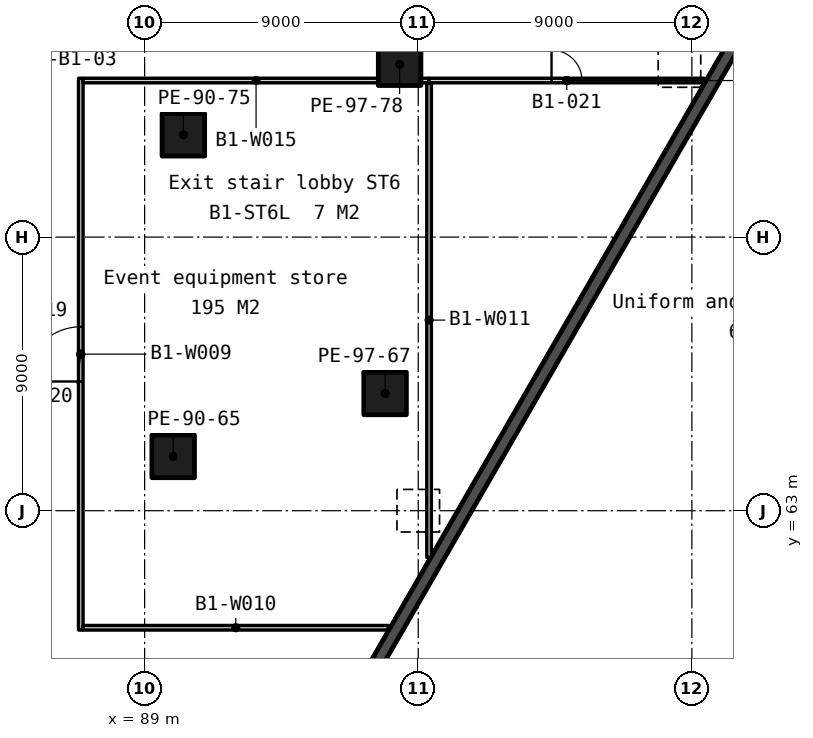
"""IFC4 building model, lengths in metres.
Left out: names, types, materials, properties, quantities, classifications, styles, units other than length and angle.
Written with IfcOpenShell. Run it as: python <this file> out.ifc"""

import sys

from ifc_helpers import new_model, si_unit, direction, frame, frame_2d, origin, origin_2d, place, context, subcontext, project, spatial, rectangle, extrude, element, fill, save


model = new_model("IFC4")
c1 = context("Model", 3, precision=1e-05, world=origin(), true_north=direction((0.0, 1.0)))
c2 = subcontext(c1, "Body", "Model", "MODEL_VIEW")
j1 = project(units=[si_unit("LENGTHUNIT", "METRE"), si_unit("PLANEANGLEUNIT", "RADIAN")], contexts=[c1])
p1 = place(None, origin())
s1 = spatial("IfcSite", under=j1, at=p1, CompositionType="ELEMENT")
p2 = place(p1, origin())
s2 = spatial("IfcBuilding", under=s1, at=p2, CompositionType="ELEMENT")
p3 = place(p2, frame((0.0, 0.0, -4.5)))
s3 = spatial("IfcBuildingStorey", under=s2, at=p3, CompositionType="ELEMENT", Elevation=-4.5)
p4 = place(p3, frame((137.688, 129.089, -0.25), z_axis=(0.0, 0.0, 1.0), x_axis=(-0.499999742059, -0.866025552707, 0.0)))
e1 = element("IfcWall", 1, at=p4, inside=s3, PredefinedType="SOLIDWALL", context=c2, shape_type="SweptSolid", body=[
    extrude(rectangle(XDim=105.659, YDim=0.4, at=frame_2d((52.829, 0.0))), origin(), (0.0, 0.0, 1.0), 4.45),
])
for number, where, z_axis, x_axis in (
    (2, (89.939, 64.786, 0.0), (0.0, 0.0, 1.0), (1.0, 0.0, 0.0)),
    (3, (90.274, 75.366, 0.0), (0.0, 0.0, 1.0), (1.0, 0.0, 0.0)),
    (4, (96.909, 66.857, 0.0), (0.0, 0.0, 1.0), (1.0, 0.0, 0.0)),
    (5, (97.387, 77.686, 0.0), (0.0, 0.0, 1.0), (1.0, 0.0, 0.0)),
):
    element("IfcColumn", number, at=place(p3, frame(where, z_axis=z_axis, x_axis=x_axis)), inside=s3, PredefinedType="COLUMN", context=c2, shape_type="SweptSolid", body=[
        extrude(rectangle(XDim=1.4, YDim=1.4, at=origin_2d()), origin(), (0.0, 0.0, 1.0), 4.5),
    ])
p5 = place(p3, frame((86.9, 59.075, 0.0), z_axis=(0.0, 0.0, 1.0), x_axis=(0.0, 1.0, 0.0)))
e6 = element("IfcWall", 6, at=p5, inside=s3, PredefinedType="PARTITIONING", context=c2, shape_type="SweptSolid", body=[
    extrude(rectangle(XDim=18.15, YDim=0.15, at=frame_2d((9.075, 0.0))), origin(), (0.0, 0.0, 1.0), 4.2),
])
p6 = place(p5, frame((8.175, 0.0, 0.0)))
e7 = element("IfcOpeningElement", 7, at=p6, cuts=e6, PredefinedType="OPENING", context=c2, shape_type="SweptSolid", body=[
    extrude(rectangle(XDim=1.8, YDim=2.1, at=frame_2d((0.9, 1.05))), frame((0.0, 0.085, 0.0), z_axis=(0.0, -1.0, 0.0), x_axis=(1.0, 0.0, 0.0)), (0.0, 0.0, 1.0), 0.17),
])
p7 = place(p3, frame((86.975, 59.15, 0.0), z_axis=(0.0, 0.0, 1.0), x_axis=(1.0, 0.0, 0.0)))
e8 = element("IfcWall", 8, at=p7, inside=s3, PredefinedType="PARTITIONING", context=c2, shape_type="SweptSolid", body=[
    extrude(rectangle(XDim=10.045, YDim=0.15, at=frame_2d((5.022, 0.0))), origin(), (0.0, 0.0, 1.0), 4.2),
])
p8 = place(p3, frame((98.356, 61.464, 0.0), z_axis=(0.0, 0.0, 1.0), x_axis=(0.0, 1.0, 0.0)))
e9 = element("IfcWall", 9, at=p8, inside=s3, PredefinedType="PARTITIONING", context=c2, shape_type="SweptSolid", body=[
    extrude(rectangle(XDim=15.611, YDim=0.15, at=frame_2d((7.805, 0.0))), origin(), (0.0, 0.0, 1.0), 4.2),
])
p9 = place(p3, frame((86.975, 77.15, 0.0), z_axis=(0.0, 0.0, 1.0), x_axis=(1.0, 0.0, 0.0)))
e10 = element("IfcWall", 10, at=p9, inside=s3, PredefinedType="PARTITIONING", context=c2, shape_type="SweptSolid", body=[
    extrude(rectangle(XDim=11.381, YDim=0.15, at=frame_2d((5.69, 0.0))), origin(), (0.0, 0.0, 1.0), 4.2),
])
p10 = place(p3, frame((98.356, 77.15, 0.0), z_axis=(0.0, 0.0, 1.0), x_axis=(1.0, 0.0, 0.0)))
e11 = element("IfcWall", 11, at=p10, inside=s3, PredefinedType="PARTITIONING", context=c2, shape_type="SweptSolid", body=[
    extrude(rectangle(XDim=9.056, YDim=0.15, at=frame_2d((4.528, 0.0))), origin(), (0.0, 0.0, 1.0), 4.2),
])
p11 = place(p10, frame((4.028, 0.0, 0.0)))
e12 = element("IfcOpeningElement", 12, at=p11, cuts=e11, PredefinedType="OPENING", context=c2, shape_type="SweptSolid", body=[
    extrude(rectangle(XDim=1.0, YDim=2.1, at=frame_2d((0.5, 1.05))), frame((0.0, 0.085, 0.0), z_axis=(0.0, -1.0, 0.0), x_axis=(1.0, 0.0, 0.0)), (0.0, 0.0, 1.0), 0.17),
])
p12 = place(p6, origin())
e13 = element("IfcDoor", 13, at=p12, inside=s3, OperationType="SINGLE_SWING_LEFT", PredefinedType="DOOR", context=c2, shape_type="SweptSolid", body=[
    extrude(rectangle(XDim=1.8, YDim=2.1, at=frame_2d((0.9, 1.05))), frame((0.0, 0.025, 0.0), z_axis=(0.0, -1.0, 0.0), x_axis=(1.0, 0.0, 0.0)), (0.0, 0.0, 1.0), 0.05),
])
fill(e7, e13)
p13 = place(p11, origin())
e14 = element("IfcDoor", 14, at=p13, inside=s3, OperationType="SINGLE_SWING_LEFT", PredefinedType="DOOR", context=c2, shape_type="SweptSolid", body=[
    extrude(rectangle(XDim=1.0, YDim=2.1, at=frame_2d((0.5, 1.05))), frame((0.0, 0.025, 0.0), z_axis=(0.0, -1.0, 0.0), x_axis=(1.0, 0.0, 0.0)), (0.0, 0.0, 1.0), 0.05),
])
fill(e12, e14)
save(model, sys.argv[1])
